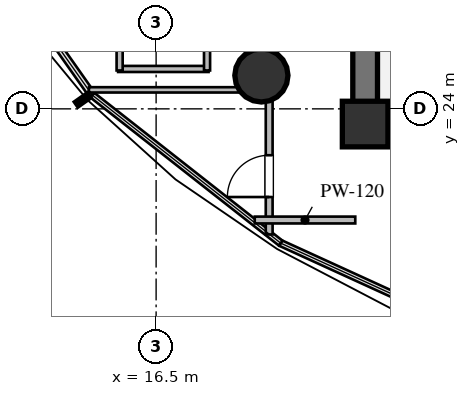
"""IFC4 building model, lengths in metres.
Left out: names, types, materials, properties, quantities, classifications, styles, units other than length and angle.
Written with IfcOpenShell. Run it as: python <this file> out.ifc"""

import sys

from ifc_helpers import new_model, si_unit, direction, frame, frame_2d, origin, origin_2d, place, context, subcontext, project, spatial, rectangle, circle, extrude, element, fill, save


model = new_model("IFC4")
c1 = context("Model", 3, precision=1e-05, world=origin(), true_north=direction((0.0, 1.0)))
c2 = subcontext(c1, "Body", "Model", "MODEL_VIEW")
j1 = project(units=[si_unit("LENGTHUNIT", "METRE"), si_unit("PLANEANGLEUNIT", "RADIAN")], contexts=[c1])
p1 = place(None, origin())
s1 = spatial("IfcSite", under=j1, at=p1, CompositionType="ELEMENT")
p2 = place(p1, origin())
s2 = spatial("IfcBuilding", under=s1, at=p2, CompositionType="ELEMENT")
p3 = place(p2, frame((0.0, 0.0, 52.8)))
s3 = spatial("IfcBuildingStorey", under=s2, at=p3, CompositionType="ELEMENT", Elevation=52.8)
p4 = place(p3, frame((21.675, 23.6, 0.0), z_axis=(0.0, 0.0, 1.0), x_axis=(1.0, 0.0, 0.0)))
e1 = element("IfcWall", 1, at=p4, inside=s3, PredefinedType="SHEAR", context=c2, shape_type="SweptSolid", body=[
    extrude(rectangle(XDim=22.65, YDim=0.65, at=frame_2d((11.325, 0.0))), origin(), (0.0, 0.0, 1.0), 3.36),
])
p5 = place(p3, frame((22.0, 23.925, 0.0), z_axis=(0.0, 0.0, 1.0), x_axis=(0.0, 1.0, 0.0)))
e2 = element("IfcWall", 2, at=p5, inside=s3, PredefinedType="SHEAR", context=c2, shape_type="SweptSolid", body=[
    extrude(rectangle(XDim=12.15, YDim=0.65, at=frame_2d((6.075, 0.0))), origin(), (0.0, 0.0, 1.0), 3.36),
])
p6 = place(p3, frame((22.0, 23.6, 0.0), z_axis=(0.0, 0.0, 1.0), x_axis=(1.0, 0.0, 0.0)))
e3 = element("IfcColumn", 3, at=p6, inside=s3, PredefinedType="COLUMN", context=c2, shape_type="SweptSolid", body=[
    extrude(rectangle(XDim=1.2, YDim=1.2, at=origin_2d()), origin(), (0.0, 0.0, 1.0), 3.6),
])
p7 = place(p3, frame((19.27, 24.88, 0.0), z_axis=(0.0, 0.0, 1.0), x_axis=(1.0, 0.0, 0.0)))
e4 = element("IfcColumn", 4, at=p7, inside=s3, PredefinedType="COLUMN", context=c2, shape_type="SweptSolid", body=[
    extrude(circle(Radius=0.7, at=origin_2d()), origin(), (0.0, 0.0, 1.0), 3.6),
])
for number, where, z_axis, x_axis in (
    (5, (15.5, 25.05, 0.0), (0.0, 0.0, 1.0), (1.0, 0.0, 0.0)),
    (6, (15.54, 25.01, 0.0), (0.0, 0.0, 1.0), (0.0, 1.0, 0.0)),
    (7, (17.84, 25.01, 0.0), (0.0, 0.0, 1.0), (0.0, 1.0, 0.0)),
):
    element("IfcWall", number, at=place(p3, frame(where, z_axis=z_axis, x_axis=x_axis)), inside=s3, PredefinedType="PLUMBINGWALL", context=c2, shape_type="SweptSolid", body=[
        extrude(rectangle(XDim=2.38, YDim=0.16, at=frame_2d((1.19, 0.0))), origin(), (0.0, 0.0, 1.0), 3.36),
    ])
p8 = place(p3, frame((19.475, 20.695, 0.0), z_axis=(0.0, 0.0, 1.0), x_axis=(0.0, 1.0, 0.0)))
e8 = element("IfcWall", 8, at=p8, inside=s3, PredefinedType="PARTITIONING", context=c2, shape_type="SweptSolid", body=[
    extrude(rectangle(XDim=3.87, YDim=0.18, at=frame_2d((1.935, 0.0))), origin(), (0.0, 0.0, 1.0), 2.738),
])
p9 = place(p8, frame((0.985, 0.0, 0.0)))
e9 = element("IfcOpeningElement", 9, at=p9, cuts=e8, PredefinedType="OPENING", context=c2, shape_type="SweptSolid", body=[
    extrude(rectangle(XDim=1.1, YDim=2.1, at=frame_2d((0.55, 1.05))), frame((0.0, 0.1, 0.0), z_axis=(0.0, -1.0, 0.0), x_axis=(1.0, 0.0, 0.0)), (0.0, 0.0, 1.0), 0.2),
])
p10 = place(p3, frame((21.74, 21.075, 0.0), z_axis=(0.0, 0.0, 1.0), x_axis=(-1.0, 0.0, 0.0)))
e10 = element("IfcWall", 10, at=p10, inside=s3, PredefinedType="PARTITIONING", context=c2, shape_type="SweptSolid", body=[
    extrude(rectangle(XDim=2.645, YDim=0.18, at=frame_2d((1.323, 0.0))), origin(), (0.0, 0.0, 1.0), 3.36),
])
p11 = place(p3, frame((19.475, 24.435, 0.0), z_axis=(0.0, 0.0, 1.0), x_axis=(0.0, 1.0, 0.0)))
e11 = element("IfcWall", 11, at=p11, inside=s3, PredefinedType="PARTITIONING", context=c2, shape_type="SweptSolid", body=[
    extrude(rectangle(XDim=7.13, YDim=0.18, at=frame_2d((3.565, 0.0))), origin(), (0.0, 0.0, 1.0), 2.738),
])
p12 = place(p11, frame((3.015, 0.0, 0.0)))
e12 = element("IfcOpeningElement", 12, at=p12, cuts=e11, PredefinedType="OPENING", context=c2, shape_type="SweptSolid", body=[
    extrude(rectangle(XDim=1.1, YDim=2.1, at=frame_2d((0.55, 1.05))), frame((0.0, 0.1, 0.0), z_axis=(0.0, -1.0, 0.0), x_axis=(1.0, 0.0, 0.0)), (0.0, 0.0, 1.0), 0.2),
])
p13 = place(p3, frame((14.732, 24.5, 0.0), z_axis=(0.0, 0.0, 1.0), x_axis=(1.0, 0.0, 0.0)))
e13 = element("IfcWall", 13, at=p13, inside=s3, PredefinedType="PARTITIONING", context=c2, shape_type="SweptSolid", body=[
    extrude(rectangle(XDim=4.773, YDim=0.14, at=frame_2d((2.386, 0.0))), origin(), (0.0, 0.0, 1.0), 2.89),
])
p14 = place(p9, origin())
e14 = element("IfcDoor", 14, at=p14, inside=s3, OperationType="SINGLE_SWING_LEFT", PredefinedType="DOOR", context=c2, shape_type="SweptSolid", body=[
    extrude(rectangle(XDim=1.1, YDim=2.1, at=frame_2d((0.55, 1.05))), frame((0.0, 0.025, 0.0), z_axis=(0.0, -1.0, 0.0), x_axis=(1.0, 0.0, 0.0)), (0.0, 0.0, 1.0), 0.05),
])
fill(e9, e14)
save(model, sys.argv[1])
